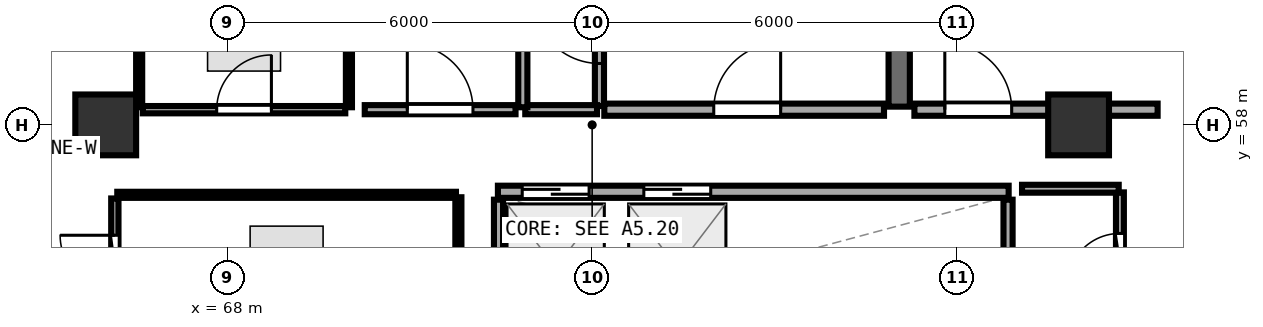
"""IFC4 building model, lengths in metres.
Left out: names, types, materials, properties, quantities, classifications, styles, units other than length and angle.
Written with IfcOpenShell. Run it as: python <this file> out.ifc"""

import sys

from ifc_helpers import new_model, si_unit, direction, frame, frame_2d, origin, origin_2d, place, context, subcontext, project, spatial, rectangle, extrude, element, fill, save


model = new_model("IFC4")
c1 = context("Model", 3, precision=1e-05, world=origin(), true_north=direction((0.0, 1.0)))
c2 = subcontext(c1, "Body", "Model", "MODEL_VIEW")
j1 = project(units=[si_unit("LENGTHUNIT", "METRE"), si_unit("PLANEANGLEUNIT", "RADIAN")], contexts=[c1])
p1 = place(None, origin())
s1 = spatial("IfcSite", under=j1, at=p1, CompositionType="ELEMENT")
p2 = place(p1, origin())
s2 = spatial("IfcBuilding", under=s1, at=p2, CompositionType="ELEMENT")
p3 = place(p2, frame((0.0, 0.0, 282.45)))
s3 = spatial("IfcBuildingStorey", under=s2, at=p3, CompositionType="ELEMENT", Elevation=282.45)
for number, where, z_axis, x_axis in (
    (1, (82.0, 58.0, 0.0), (0.0, 0.0, 1.0), (1.0, 0.0, 0.0)),
    (2, (66.0, 58.0, 0.0), (0.0, 0.0, 1.0), (1.0, 0.0, 0.0)),
):
    element("IfcColumn", number, at=place(p3, frame(where, z_axis=z_axis, x_axis=x_axis)), inside=s3, PredefinedType="PILASTER", context=c2, shape_type="SweptSolid", body=[
        extrude(rectangle(XDim=1.0, YDim=1.0, at=origin_2d()), origin(), (0.0, 0.0, 1.0), 3.75),
    ])
p4 = place(p3, frame((79.05, 58.3, 0.0), z_axis=(0.0, 0.0, 1.0), x_axis=(0.0, 1.0, 0.0)))
e3 = element("IfcWall", 3, at=p4, inside=s3, PredefinedType="SHEAR", context=c2, shape_type="SweptSolid", body=[
    extrude(rectangle(XDim=6.3, YDim=0.35, at=frame_2d((3.15, 0.0))), origin(), (0.0, 0.0, 1.0), 3.49),
])
p5 = place(p3, frame((74.2, 58.25, 0.0), z_axis=(0.0, 0.0, 1.0), x_axis=(1.0, 0.0, 0.0)))
e4 = element("IfcWall", 4, at=p5, inside=s3, PredefinedType="SOLIDWALL", context=c2, shape_type="SweptSolid", body=[
    extrude(rectangle(XDim=4.6, YDim=0.2, at=frame_2d((2.3, 0.0))), origin(), (0.0, 0.0, 1.0), 3.48),
])
p6 = place(p5, frame((1.8, 0.0, 0.0)))
e5 = element("IfcOpeningElement", 5, at=p6, cuts=e4, PredefinedType="OPENING", context=c2, shape_type="SweptSolid", body=[
    extrude(rectangle(XDim=1.1, YDim=2.1, at=frame_2d((0.55, 1.05))), frame((0.0, 0.11, 0.0), z_axis=(0.0, -1.0, 0.0), x_axis=(1.0, 0.0, 0.0)), (0.0, 0.0, 1.0), 0.22),
])
p7 = place(p3, frame((79.3, 58.25, 0.0), z_axis=(0.0, 0.0, 1.0), x_axis=(1.0, 0.0, 0.0)))
e6 = element("IfcWall", 6, at=p7, inside=s3, PredefinedType="SOLIDWALL", context=c2, shape_type="SweptSolid", body=[
    extrude(rectangle(XDim=4.0, YDim=0.2, at=frame_2d((2.0, 0.0))), origin(), (0.0, 0.0, 1.0), 2.775),
])
p8 = place(p7, frame((0.5, 0.0, 0.0)))
e7 = element("IfcOpeningElement", 7, at=p8, cuts=e6, PredefinedType="OPENING", context=c2, shape_type="SweptSolid", body=[
    extrude(rectangle(XDim=1.1, YDim=2.1, at=frame_2d((0.55, 1.05))), frame((0.0, 0.11, 0.0), z_axis=(0.0, -1.0, 0.0), x_axis=(1.0, 0.0, 0.0)), (0.0, 0.0, 1.0), 0.22),
])
p9 = place(p3, frame((72.45, 56.9, 0.0), z_axis=(0.0, 0.0, 1.0), x_axis=(1.0, 0.0, 0.0)))
e8 = element("IfcWall", 8, at=p9, inside=s3, PredefinedType="SOLIDWALL", context=c2, shape_type="SweptSolid", body=[
    extrude(rectangle(XDim=8.4, YDim=0.2, at=frame_2d((4.2, 0.0))), origin(), (0.0, 0.0, 1.0), 3.48),
])
p10 = place(p9, frame((0.4, 0.0, 0.0)))
e9 = element("IfcOpeningElement", 9, at=p10, cuts=e8, PredefinedType="OPENING", context=c2, shape_type="SweptSolid", body=[
    extrude(rectangle(XDim=1.1, YDim=2.1, at=frame_2d((0.55, 1.05))), frame((0.0, 0.11, 0.0), z_axis=(0.0, -1.0, 0.0), x_axis=(1.0, 0.0, 0.0)), (0.0, 0.0, 1.0), 0.22),
])
p11 = place(p9, frame((2.4, 0.0, 0.0)))
e10 = element("IfcOpeningElement", 10, at=p11, cuts=e8, PredefinedType="OPENING", context=c2, shape_type="SweptSolid", body=[
    extrude(rectangle(XDim=1.1, YDim=2.1, at=frame_2d((0.55, 1.05))), frame((0.0, 0.11, 0.0), z_axis=(0.0, -1.0, 0.0), x_axis=(1.0, 0.0, 0.0)), (0.0, 0.0, 1.0), 0.22),
])
for number, where, z_axis, x_axis in (
    (11, (72.46, 54.48, 0.0), (0.0, 0.0, 1.0), (0.0, 1.0, 0.0)),
    (12, (80.84, 54.48, 0.0), (0.0, 0.0, 1.0), (0.0, 1.0, 0.0)),
):
    element("IfcWall", number, at=place(p3, frame(where, z_axis=z_axis, x_axis=x_axis)), inside=s3, PredefinedType="PARTITIONING", context=c2, shape_type="SweptSolid", body=[
        extrude(rectangle(XDim=2.29, YDim=0.15, at=frame_2d((1.145, 0.0))), origin(), (0.0, 0.0, 1.0), 3.48),
    ])
p12 = place(p3, frame((74.12, 58.31, 0.0), z_axis=(0.0, 0.0, 1.0), x_axis=(0.0, 1.0, 0.0)))
e13 = element("IfcWall", 13, at=p12, inside=s3, PredefinedType="PARTITIONING", context=c2, shape_type="SweptSolid", body=[
    extrude(rectangle(XDim=2.48, YDim=0.15, at=frame_2d((1.24, 0.0))), origin(), (0.0, 0.0, 1.0), 3.48),
])
p13 = place(p12, frame((0.7, 0.0, 0.0)))
e14 = element("IfcOpeningElement", 14, at=p13, cuts=e13, PredefinedType="OPENING", context=c2, shape_type="SweptSolid", body=[
    extrude(rectangle(XDim=1.08, YDim=2.1, at=frame_2d((0.54, 1.05))), frame((0.0, 0.085, 0.0), z_axis=(0.0, -1.0, 0.0), x_axis=(1.0, 0.0, 0.0)), (0.0, 0.0, 1.0), 0.17),
])
p14 = place(p3, frame((82.68, 54.68, 0.0), z_axis=(0.0, 0.0, 1.0), x_axis=(0.0, 1.0, 0.0)))
e15 = element("IfcWall", 15, at=p14, inside=s3, PredefinedType="PLUMBINGWALL", context=c2, shape_type="SweptSolid", body=[
    extrude(rectangle(XDim=2.21, YDim=0.13, at=frame_2d((1.105, 0.0))), origin(), (0.0, 0.0, 1.0), 3.48),
])
p15 = place(p14, frame((0.675, 0.0, 0.0)))
e16 = element("IfcOpeningElement", 16, at=p15, cuts=e15, PredefinedType="OPENING", context=c2, shape_type="SweptSolid", body=[
    extrude(rectangle(XDim=0.86, YDim=2.05, at=frame_2d((0.43, 1.025))), frame((0.0, 0.075, 0.0), z_axis=(0.0, -1.0, 0.0), x_axis=(1.0, 0.0, 0.0)), (0.0, 0.0, 1.0), 0.15),
])
p16 = place(p3, frame((66.61, 58.25, 0.0), z_axis=(0.0, 0.0, 1.0), x_axis=(1.0, 0.0, 0.0)))
e17 = element("IfcWall", 17, at=p16, inside=s3, PredefinedType="PARTITIONING", context=c2, shape_type="SweptSolid", body=[
    extrude(rectangle(XDim=3.33, YDim=0.12, at=frame_2d((1.665, 0.0))), origin(), (0.0, 0.0, 1.0), 3.48),
])
p17 = place(p16, frame((1.215, 0.0, 0.0)))
e18 = element("IfcOpeningElement", 18, at=p17, cuts=e17, PredefinedType="OPENING", context=c2, shape_type="SweptSolid", body=[
    extrude(rectangle(XDim=0.9, YDim=2.08, at=frame_2d((0.45, 1.04))), frame((0.0, 0.07, 0.0), z_axis=(0.0, -1.0, 0.0), x_axis=(1.0, 0.0, 0.0)), (0.0, 0.0, 1.0), 0.14),
])
p18 = place(p3, frame((70.26, 58.25, 0.0), z_axis=(0.0, 0.0, 1.0), x_axis=(1.0, 0.0, 0.0)))
e19 = element("IfcWall", 19, at=p18, inside=s3, PredefinedType="PARTITIONING", context=c2, shape_type="SweptSolid", body=[
    extrude(rectangle(XDim=2.48, YDim=0.15, at=frame_2d((1.24, 0.0))), origin(), (0.0, 0.0, 1.0), 3.48),
])
p19 = place(p18, frame((0.7, 0.0, 0.0)))
e20 = element("IfcOpeningElement", 20, at=p19, cuts=e19, PredefinedType="OPENING", context=c2, shape_type="SweptSolid", body=[
    extrude(rectangle(XDim=1.08, YDim=2.1, at=frame_2d((0.54, 1.05))), frame((0.0, 0.085, 0.0), z_axis=(0.0, -1.0, 0.0), x_axis=(1.0, 0.0, 0.0)), (0.0, 0.0, 1.0), 0.17),
])
p20 = place(p3, frame((66.15, 54.68, 0.0), z_axis=(0.0, 0.0, 1.0), x_axis=(0.0, 1.0, 0.0)))
e21 = element("IfcWall", 21, at=p20, inside=s3, PredefinedType="PARTITIONING", context=c2, shape_type="SweptSolid", body=[
    extrude(rectangle(XDim=2.11, YDim=0.12, at=frame_2d((1.055, 0.0))), origin(), (0.0, 0.0, 1.0), 2.775),
])
p21 = place(p20, frame((0.605, 0.0, 0.0)))
e22 = element("IfcOpeningElement", 22, at=p21, cuts=e21, PredefinedType="OPENING", context=c2, shape_type="SweptSolid", body=[
    extrude(rectangle(XDim=0.9, YDim=2.08, at=frame_2d((0.45, 1.04))), frame((0.0, 0.07, 0.0), z_axis=(0.0, -1.0, 0.0), x_axis=(1.0, 0.0, 0.0)), (0.0, 0.0, 1.0), 0.14),
])
p22 = place(p3, frame((72.9, 58.25, 0.0), z_axis=(0.0, 0.0, 1.0), x_axis=(1.0, 0.0, 0.0)))
e23 = element("IfcWall", 23, at=p22, inside=s3, PredefinedType="PARTITIONING", context=c2, shape_type="SweptSolid", body=[
    extrude(rectangle(XDim=1.18, YDim=0.15, at=frame_2d((0.59, 0.0))), origin(), (0.0, 0.0, 1.0), 3.48),
])
p23 = place(p3, frame((72.86, 60.81, 0.0), z_axis=(0.0, 0.0, 1.0), x_axis=(0.0, -1.0, 0.0)))
e24 = element("IfcWall", 24, at=p23, inside=s3, PredefinedType="PARTITIONING", context=c2, shape_type="SweptSolid", body=[
    extrude(rectangle(XDim=2.52, YDim=0.15, at=frame_2d((1.26, 0.0))), origin(), (0.0, 0.0, 1.0), 3.48),
])
p24 = place(p3, frame((82.66, 56.95, 0.0), z_axis=(0.0, 0.0, 1.0), x_axis=(-1.0, 0.0, 0.0)))
e25 = element("IfcWall", 25, at=p24, inside=s3, PredefinedType="PLUMBINGWALL", context=c2, shape_type="SweptSolid", body=[
    extrude(rectangle(XDim=1.59, YDim=0.13, at=frame_2d((0.795, 0.0))), origin(), (0.0, 0.0, 1.0), 2.775),
])
for number, where, z_axis, x_axis in (
    (26, (70.0, 58.29, 0.0), (0.0, 0.0, 1.0), (0.0, 1.0, 0.0)),
    (27, (66.55, 60.68, 0.0), (0.0, 0.0, 1.0), (0.0, -1.0, 0.0)),
):
    element("IfcWall", number, at=place(p3, frame(where, z_axis=z_axis, x_axis=x_axis)), inside=s3, PredefinedType="PARTITIONING", context=c2, shape_type="SweptSolid", body=[
        extrude(rectangle(XDim=2.39, YDim=0.1, at=frame_2d((1.195, 0.0))), origin(), (0.0, 0.0, 1.0), 3.48),
    ])
p25 = place(p3, frame((71.8, 54.66, 0.0), z_axis=(0.0, 0.0, 1.0), x_axis=(0.0, 1.0, 0.0)))
e28 = element("IfcWall", 28, at=p25, inside=s3, PredefinedType="PARTITIONING", context=c2, shape_type="SweptSolid", body=[
    extrude(rectangle(XDim=2.15, YDim=0.1, at=frame_2d((1.075, 0.0))), origin(), (0.0, 0.0, 1.0), 3.48),
])
p26 = place(p3, frame((71.76, 56.85, 0.0), z_axis=(0.0, 0.0, 1.0), x_axis=(-1.0, 0.0, 0.0)))
e29 = element("IfcWall", 29, at=p26, inside=s3, PredefinedType="PARTITIONING", context=c2, shape_type="SweptSolid", body=[
    extrude(rectangle(XDim=5.57, YDim=0.1, at=frame_2d((2.785, 0.0))), origin(), (0.0, 0.0, 1.0), 2.775),
])
p27 = place(p6, frame((1.1, 0.0, 0.0), z_axis=(0.0, 0.0, 1.0), x_axis=(-1.0, 0.0, 0.0)))
e30 = element("IfcDoor", 30, at=p27, inside=s3, OperationType="SINGLE_SWING_LEFT", PredefinedType="DOOR", context=c2, shape_type="SweptSolid", body=[
    extrude(rectangle(XDim=1.1, YDim=2.1, at=frame_2d((0.55, 1.05))), frame((0.0, 0.025, 0.0), z_axis=(0.0, -1.0, 0.0), x_axis=(1.0, 0.0, 0.0)), (0.0, 0.0, 1.0), 0.05),
])
fill(e5, e30)
p28 = place(p8, frame((1.1, 0.0, 0.0), z_axis=(0.0, 0.0, 1.0), x_axis=(-1.0, 0.0, 0.0)))
e31 = element("IfcDoor", 31, at=p28, inside=s3, OperationType="SINGLE_SWING_RIGHT", PredefinedType="DOOR", context=c2, shape_type="SweptSolid", body=[
    extrude(rectangle(XDim=1.1, YDim=2.1, at=frame_2d((0.55, 1.05))), frame((0.0, 0.025, 0.0), z_axis=(0.0, -1.0, 0.0), x_axis=(1.0, 0.0, 0.0)), (0.0, 0.0, 1.0), 0.05),
])
fill(e7, e31)
p29 = place(p10, origin())
e32 = element("IfcDoor", 32, at=p29, inside=s3, OperationType="DOUBLE_DOOR_SLIDING", PredefinedType="DOOR", context=c2, shape_type="SweptSolid", body=[
    extrude(rectangle(XDim=1.1, YDim=2.1, at=frame_2d((0.55, 1.05))), frame((0.0, 0.025, 0.0), z_axis=(0.0, -1.0, 0.0), x_axis=(1.0, 0.0, 0.0)), (0.0, 0.0, 1.0), 0.05),
])
fill(e9, e32)
p30 = place(p11, origin())
e33 = element("IfcDoor", 33, at=p30, inside=s3, OperationType="DOUBLE_DOOR_SLIDING", PredefinedType="DOOR", context=c2, shape_type="SweptSolid", body=[
    extrude(rectangle(XDim=1.1, YDim=2.1, at=frame_2d((0.55, 1.05))), frame((0.0, 0.025, 0.0), z_axis=(0.0, -1.0, 0.0), x_axis=(1.0, 0.0, 0.0)), (0.0, 0.0, 1.0), 0.05),
])
fill(e10, e33)
p31 = place(p13, origin())
e34 = element("IfcDoor", 34, at=p31, inside=s3, OperationType="SINGLE_SWING_RIGHT", PredefinedType="DOOR", context=c2, shape_type="SweptSolid", body=[
    extrude(rectangle(XDim=1.08, YDim=2.1, at=frame_2d((0.54, 1.05))), frame((0.0, 0.025, 0.0), z_axis=(0.0, -1.0, 0.0), x_axis=(1.0, 0.0, 0.0)), (0.0, 0.0, 1.0), 0.05),
])
fill(e14, e34)
p32 = place(p15, origin())
e35 = element("IfcDoor", 35, at=p32, inside=s3, OperationType="SINGLE_SWING_LEFT", PredefinedType="DOOR", context=c2, shape_type="SweptSolid", body=[
    extrude(rectangle(XDim=0.86, YDim=2.05, at=frame_2d((0.43, 1.025))), frame((0.0, 0.025, 0.0), z_axis=(0.0, -1.0, 0.0), x_axis=(1.0, 0.0, 0.0)), (0.0, 0.0, 1.0), 0.05),
])
fill(e16, e35)
p33 = place(p17, origin())
e36 = element("IfcDoor", 36, at=p33, inside=s3, OperationType="SINGLE_SWING_RIGHT", PredefinedType="DOOR", context=c2, shape_type="SweptSolid", body=[
    extrude(rectangle(XDim=0.9, YDim=2.08, at=frame_2d((0.45, 1.04))), frame((0.0, 0.025, 0.0), z_axis=(0.0, -1.0, 0.0), x_axis=(1.0, 0.0, 0.0)), (0.0, 0.0, 1.0), 0.05),
])
fill(e18, e36)
p34 = place(p19, origin())
e37 = element("IfcDoor", 37, at=p34, inside=s3, OperationType="SINGLE_SWING_LEFT", PredefinedType="DOOR", context=c2, shape_type="SweptSolid", body=[
    extrude(rectangle(XDim=1.08, YDim=2.1, at=frame_2d((0.54, 1.05))), frame((0.0, 0.025, 0.0), z_axis=(0.0, -1.0, 0.0), x_axis=(1.0, 0.0, 0.0)), (0.0, 0.0, 1.0), 0.05),
])
fill(e20, e37)
p35 = place(p21, origin())
e38 = element("IfcDoor", 38, at=p35, inside=s3, OperationType="SINGLE_SWING_RIGHT", PredefinedType="DOOR", context=c2, shape_type="SweptSolid", body=[
    extrude(rectangle(XDim=0.9, YDim=2.08, at=frame_2d((0.45, 1.04))), frame((0.0, 0.025, 0.0), z_axis=(0.0, -1.0, 0.0), x_axis=(1.0, 0.0, 0.0)), (0.0, 0.0, 1.0), 0.05),
])
fill(e22, e38)
save(model, sys.argv[1])
